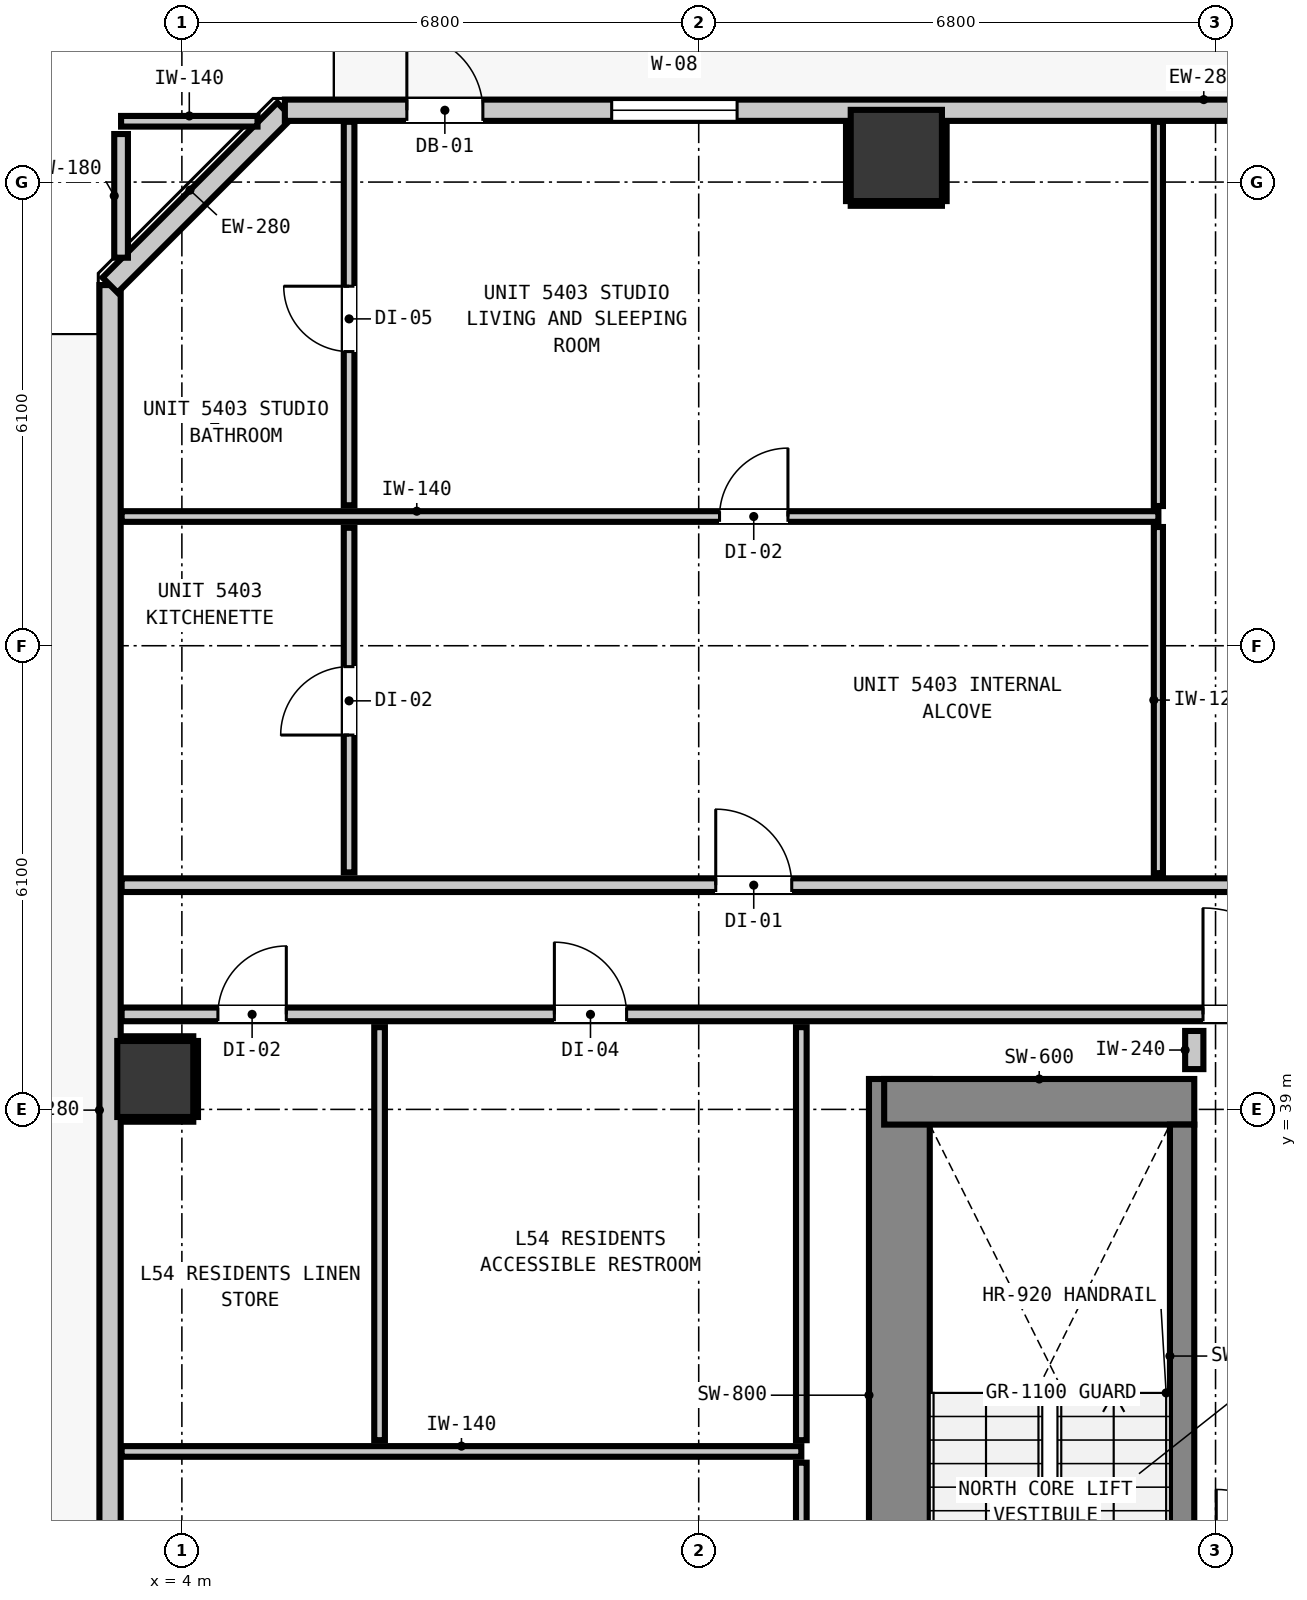
"""IFC4 building model, lengths in metres.
Left out: names, types, materials, properties, quantities, classifications, styles, units other than length and angle.
Written with IfcOpenShell. Run it as: python <this file> out.ifc"""

import sys

from ifc_helpers import new_model, si_unit, direction, frame, frame_2d, origin, origin_2d, place, context, subcontext, project, spatial, rectangle, extrude, element, fill, save


model = new_model("IFC4")
c1 = context("Model", 3, precision=1e-05, world=origin(), true_north=direction((0.0, 1.0)))
c2 = subcontext(c1, "Body", "Model", "MODEL_VIEW")
j1 = project(units=[si_unit("LENGTHUNIT", "METRE"), si_unit("PLANEANGLEUNIT", "RADIAN")], contexts=[c1])
p1 = place(None, origin())
s1 = spatial("IfcSite", under=j1, at=p1, CompositionType="ELEMENT")
p2 = place(p1, origin())
s2 = spatial("IfcBuilding", under=s1, at=p2, CompositionType="ELEMENT")
p3 = place(p2, frame((0.0, 0.0, 186.84)))
s3 = spatial("IfcBuildingStorey", under=s2, at=p3, CompositionType="ELEMENT", Elevation=186.84)
p4 = place(p3, frame((13.44, 31.08, 0.0), z_axis=(0.0, 0.0, 1.0), x_axis=(0.0, 1.0, 0.0)))
e1 = element("IfcWall", 1, at=p4, inside=s3, PredefinedType="SHEAR", context=c2, shape_type="SweptSolid", body=[
    extrude(rectangle(XDim=8.32, YDim=0.8, at=frame_2d((4.16, 0.0))), origin(), (0.0, 0.0, 1.0), 3.32),
])
p5 = place(p3, frame((13.24, 39.1, 0.0), z_axis=(0.0, 0.0, 1.0), x_axis=(1.0, 0.0, 0.0)))
e2 = element("IfcWall", 2, at=p5, inside=s3, PredefinedType="SHEAR", context=c2, shape_type="SweptSolid", body=[
    extrude(rectangle(XDim=4.08, YDim=0.6, at=frame_2d((2.04, 0.0))), origin(), (0.0, 0.0, 1.0), 3.32),
])
p6 = place(p3, frame((17.16, 31.0, 0.0), z_axis=(0.0, 0.0, 1.0), x_axis=(0.0, 1.0, 0.0)))
e3 = element("IfcWall", 3, at=p6, inside=s3, PredefinedType="SHEAR", context=c2, shape_type="SweptSolid", body=[
    extrude(rectangle(XDim=7.8, YDim=0.32, at=frame_2d((3.9, 0.0))), origin(), (0.0, 0.0, 1.0), 3.32),
])
p7 = place(p6, frame((0.51, 0.0, 0.0)))
e4 = element("IfcOpeningElement", 4, at=p7, cuts=e3, PredefinedType="OPENING", context=c2, shape_type="SweptSolid", body=[
    extrude(rectangle(XDim=1.1, YDim=2.15, at=frame_2d((0.55, 1.075))), frame((0.0, 0.17, 0.0), z_axis=(0.0, -1.0, 0.0), x_axis=(1.0, 0.0, 0.0)), (0.0, 0.0, 1.0), 0.34),
])
p8 = place(p3, frame((13.4, 51.55, 0.0), z_axis=(0.0, 0.0, 1.0), x_axis=(1.0, 0.0, 0.0)))
e5 = element("IfcColumn", 5, at=p8, inside=s3, PredefinedType="COLUMN", context=c2, shape_type="SweptSolid", body=[
    extrude(rectangle(XDim=1.2, YDim=1.2, at=origin_2d()), origin(), (0.0, 0.0, 1.0), 2.9),
])
p9 = place(p3, frame((3.65, 39.4, 0.0), z_axis=(0.0, 0.0, 1.0), x_axis=(1.0, 0.0, 0.0)))
e6 = element("IfcColumn", 6, at=p9, inside=s3, PredefinedType="COLUMN", context=c2, shape_type="SweptSolid", body=[
    extrude(rectangle(XDim=1.0, YDim=1.0, at=origin_2d()), origin(), (0.0, 0.0, 1.0), 2.9),
])
p10 = place(p3, frame((3.055, 17.555, 0.0), z_axis=(0.0, 0.0, 1.0), x_axis=(0.0, 1.0, 0.0)))
e7 = element("IfcWall", 7, at=p10, inside=s3, PredefinedType="STANDARD", context=c2, shape_type="SweptSolid", body=[
    extrude(rectangle(XDim=32.29, YDim=0.28, at=frame_2d((16.145, 0.0))), origin(), (0.0, 0.0, 1.0), 2.9),
])
p11 = place(p10, frame((5.467, 0.0, 0.0)))
e8 = element("IfcOpeningElement", 8, at=p11, cuts=e7, PredefinedType="OPENING", context=c2, shape_type="SweptSolid", body=[
    extrude(rectangle(XDim=1.0, YDim=2.15, at=frame_2d((0.5, 1.075))), frame((0.0, 0.15, 0.0), z_axis=(0.0, -1.0, 0.0), x_axis=(1.0, 0.0, 0.0)), (0.0, 0.0, 1.0), 0.3),
])
p12 = place(p10, frame((8.831, 0.0, 0.85)))
e9 = element("IfcOpeningElement", 9, at=p12, cuts=e7, PredefinedType="OPENING", context=c2, shape_type="SweptSolid", body=[
    extrude(rectangle(XDim=1.65, YDim=1.75, at=frame_2d((0.825, 0.875))), frame((0.0, 0.15, 0.0), z_axis=(0.0, -1.0, 0.0), x_axis=(1.0, 0.0, 0.0)), (0.0, 0.0, 1.0), 0.3),
])
p13 = place(p3, frame((3.055, 49.845, 0.0), z_axis=(0.0, 0.0, 1.0), x_axis=(0.707106781187, 0.707106781187, 0.0)))
e10 = element("IfcWall", 10, at=p13, inside=s3, PredefinedType="STANDARD", context=c2, shape_type="SweptSolid", body=[
    extrude(rectangle(XDim=3.253, YDim=0.28, at=frame_2d((1.626, 0.0))), origin(), (0.0, 0.0, 1.0), 2.9),
])
p14 = place(p3, frame((5.355, 52.145, 0.0), z_axis=(0.0, 0.0, 1.0), x_axis=(1.0, 0.0, 0.0)))
e11 = element("IfcWall", 11, at=p14, inside=s3, PredefinedType="STANDARD", context=c2, shape_type="SweptSolid", body=[
    extrude(rectangle(XDim=35.09, YDim=0.28, at=frame_2d((17.545, 0.0))), origin(), (0.0, 0.0, 1.0), 2.9),
])
p15 = place(p14, frame((1.605, 0.0, 0.0)))
e12 = element("IfcOpeningElement", 12, at=p15, cuts=e11, PredefinedType="OPENING", context=c2, shape_type="SweptSolid", body=[
    extrude(rectangle(XDim=1.0, YDim=2.15, at=frame_2d((0.5, 1.075))), frame((0.0, 0.15, 0.0), z_axis=(0.0, -1.0, 0.0), x_axis=(1.0, 0.0, 0.0)), (0.0, 0.0, 1.0), 0.3),
])
p16 = place(p14, frame((4.3, 0.0, 0.85)))
e13 = element("IfcOpeningElement", 13, at=p16, cuts=e11, PredefinedType="OPENING", context=c2, shape_type="SweptSolid", body=[
    extrude(rectangle(XDim=1.65, YDim=1.75, at=frame_2d((0.825, 0.875))), frame((0.0, 0.15, 0.0), z_axis=(0.0, -1.0, 0.0), x_axis=(1.0, 0.0, 0.0)), (0.0, 0.0, 1.0), 0.3),
])
p17 = place(p14, frame((18.23, 0.0, 0.85)))
e14 = element("IfcOpeningElement", 14, at=p17, cuts=e11, PredefinedType="OPENING", context=c2, shape_type="SweptSolid", body=[
    extrude(rectangle(XDim=1.65, YDim=1.75, at=frame_2d((0.825, 0.875))), frame((0.0, 0.15, 0.0), z_axis=(0.0, -1.0, 0.0), x_axis=(1.0, 0.0, 0.0)), (0.0, 0.0, 1.0), 0.3),
])
p18 = place(p14, frame((26.67, 0.0, 0.85)))
e15 = element("IfcOpeningElement", 15, at=p18, cuts=e11, PredefinedType="OPENING", context=c2, shape_type="SweptSolid", body=[
    extrude(rectangle(XDim=1.65, YDim=1.75, at=frame_2d((0.825, 0.875))), frame((0.0, 0.15, 0.0), z_axis=(0.0, -1.0, 0.0), x_axis=(1.0, 0.0, 0.0)), (0.0, 0.0, 1.0), 0.3),
])
p19 = place(p3, frame((3.207, 40.25, 0.0), z_axis=(0.0, 0.0, 1.0), x_axis=(1.0, 0.0, 0.0)))
e16 = element("IfcWall", 16, at=p19, inside=s3, PredefinedType="PARTITIONING", context=c2, shape_type="SweptSolid", body=[
    extrude(rectangle(XDim=39.386, YDim=0.18, at=frame_2d((19.693, 0.0))), origin(), (0.0, 0.0, 1.0), 2.9),
])
p20 = place(p19, frame((14.228, 0.0, 0.0)))
e17 = element("IfcOpeningElement", 17, at=p20, cuts=e16, PredefinedType="OPENING", context=c2, shape_type="SweptSolid", body=[
    extrude(rectangle(XDim=1.4, YDim=2.15, at=frame_2d((0.7, 1.075))), frame((0.0, 0.1, 0.0), z_axis=(0.0, -1.0, 0.0), x_axis=(1.0, 0.0, 0.0)), (0.0, 0.0, 1.0), 0.2),
])
p21 = place(p19, frame((1.267, 0.0, 0.0)))
e18 = element("IfcOpeningElement", 18, at=p21, cuts=e16, PredefinedType="OPENING", context=c2, shape_type="SweptSolid", body=[
    extrude(rectangle(XDim=0.9, YDim=2.1, at=frame_2d((0.45, 1.05))), frame((0.0, 0.1, 0.0), z_axis=(0.0, -1.0, 0.0), x_axis=(1.0, 0.0, 0.0)), (0.0, 0.0, 1.0), 0.2),
])
p22 = place(p19, frame((5.694, 0.0, 0.0)))
e19 = element("IfcOpeningElement", 19, at=p22, cuts=e16, PredefinedType="OPENING", context=c2, shape_type="SweptSolid", body=[
    extrude(rectangle(XDim=0.95, YDim=2.1, at=frame_2d((0.475, 1.05))), frame((0.0, 0.1, 0.0), z_axis=(0.0, -1.0, 0.0), x_axis=(1.0, 0.0, 0.0)), (0.0, 0.0, 1.0), 0.2),
])
p23 = place(p19, frame((36.494, 0.0, 0.0)))
e20 = element("IfcOpeningElement", 20, at=p23, cuts=e16, PredefinedType="OPENING", context=c2, shape_type="SweptSolid", body=[
    extrude(rectangle(XDim=0.9, YDim=2.1, at=frame_2d((0.45, 1.05))), frame((0.0, 0.1, 0.0), z_axis=(0.0, -1.0, 0.0), x_axis=(1.0, 0.0, 0.0)), (0.0, 0.0, 1.0), 0.2),
])
p24 = place(p3, frame((3.207, 41.95, 0.0), z_axis=(0.0, 0.0, 1.0), x_axis=(1.0, 0.0, 0.0)))
e21 = element("IfcWall", 21, at=p24, inside=s3, PredefinedType="PARTITIONING", context=c2, shape_type="SweptSolid", body=[
    extrude(rectangle(XDim=39.386, YDim=0.18, at=frame_2d((19.693, 0.0))), origin(), (0.0, 0.0, 1.0), 2.9),
])
p25 = place(p24, frame((7.817, 0.0, 0.0)))
e22 = element("IfcOpeningElement", 22, at=p25, cuts=e21, PredefinedType="OPENING", context=c2, shape_type="SweptSolid", body=[
    extrude(rectangle(XDim=1.0, YDim=2.15, at=frame_2d((0.5, 1.075))), frame((0.0, 0.1, 0.0), z_axis=(0.0, -1.0, 0.0), x_axis=(1.0, 0.0, 0.0)), (0.0, 0.0, 1.0), 0.2),
])
p26 = place(p24, frame((18.527, 0.0, 0.0)))
e23 = element("IfcOpeningElement", 23, at=p26, cuts=e21, PredefinedType="OPENING", context=c2, shape_type="SweptSolid", body=[
    extrude(rectangle(XDim=0.9, YDim=2.1, at=frame_2d((0.45, 1.05))), frame((0.0, 0.1, 0.0), z_axis=(0.0, -1.0, 0.0), x_axis=(1.0, 0.0, 0.0)), (0.0, 0.0, 1.0), 0.2),
])
p27 = place(p24, frame((31.379, 0.0, 0.0)))
e24 = element("IfcOpeningElement", 24, at=p27, cuts=e21, PredefinedType="OPENING", context=c2, shape_type="SweptSolid", body=[
    extrude(rectangle(XDim=0.9, YDim=2.1, at=frame_2d((0.45, 1.05))), frame((0.0, 0.1, 0.0), z_axis=(0.0, -1.0, 0.0), x_axis=(1.0, 0.0, 0.0)), (0.0, 0.0, 1.0), 0.2),
])
p28 = place(p3, frame((3.207, 34.5, 0.0), z_axis=(0.0, 0.0, 1.0), x_axis=(1.0, 0.0, 0.0)))
e25 = element("IfcWall", 25, at=p28, inside=s3, PredefinedType="PARTITIONING", context=c2, shape_type="SweptSolid", body=[
    extrude(rectangle(XDim=8.943, YDim=0.14, at=frame_2d((4.471, 0.0))), origin(), (0.0, 0.0, 1.0), 2.9),
])
p29 = place(p3, frame((3.207, 46.8, 0.0), z_axis=(0.0, 0.0, 1.0), x_axis=(1.0, 0.0, 0.0)))
e26 = element("IfcWall", 26, at=p29, inside=s3, PredefinedType="PARTITIONING", context=c2, shape_type="SweptSolid", body=[
    extrude(rectangle(XDim=13.641, YDim=0.14, at=frame_2d((6.82, 0.0))), origin(), (0.0, 0.0, 1.0), 2.9),
])
p30 = place(p29, frame((7.867, 0.0, 0.0)))
e27 = element("IfcOpeningElement", 27, at=p30, cuts=e26, PredefinedType="OPENING", context=c2, shape_type="SweptSolid", body=[
    extrude(rectangle(XDim=0.9, YDim=2.1, at=frame_2d((0.45, 1.05))), frame((0.0, 0.08, 0.0), z_axis=(0.0, -1.0, 0.0), x_axis=(1.0, 0.0, 0.0)), (0.0, 0.0, 1.0), 0.16),
])
p31 = place(p3, frame((3.2, 52.0, 0.0), z_axis=(0.0, 0.0, 1.0), x_axis=(1.0, 0.0, 0.0)))
e28 = element("IfcWall", 28, at=p31, inside=s3, PredefinedType="PARTITIONING", context=c2, shape_type="SweptSolid", body=[
    extrude(rectangle(XDim=1.795, YDim=0.14, at=frame_2d((0.897, 0.0))), origin(), (0.0, 0.0, 1.0), 2.9),
])
p32 = place(p3, frame((17.32, 39.53, 0.0), z_axis=(0.0, 0.0, 1.0), x_axis=(0.0, 1.0, 0.0)))
e29 = element("IfcWall", 29, at=p32, inside=s3, PredefinedType="PARTITIONING", context=c2, shape_type="SweptSolid", body=[
    extrude(rectangle(XDim=0.502, YDim=0.24, at=frame_2d((0.251, 0.0))), origin(), (0.0, 0.0, 1.0), 2.9),
])
p33 = place(p3, frame((3.2, 50.205, 0.0), z_axis=(0.0, 0.0, 1.0), x_axis=(0.0, 1.0, 0.0)))
e30 = element("IfcWall", 30, at=p33, inside=s3, PredefinedType="PARTITIONING", context=c2, shape_type="SweptSolid", body=[
    extrude(rectangle(XDim=1.627, YDim=0.18, at=frame_2d((0.813, 0.0))), origin(), (0.0, 0.0, 1.0), 2.9),
])
p34 = place(p3, frame((6.2, 42.118, 0.0), z_axis=(0.0, 0.0, 1.0), x_axis=(0.0, 1.0, 0.0)))
e31 = element("IfcWall", 31, at=p34, inside=s3, PredefinedType="PARTITIONING", context=c2, shape_type="SweptSolid", body=[
    extrude(rectangle(XDim=4.534, YDim=0.14, at=frame_2d((2.267, 0.0))), origin(), (0.0, 0.0, 1.0), 2.9),
])
p35 = place(p34, frame((1.807, 0.0, 0.0)))
e32 = element("IfcOpeningElement", 32, at=p35, cuts=e31, PredefinedType="OPENING", context=c2, shape_type="SweptSolid", body=[
    extrude(rectangle(XDim=0.9, YDim=2.1, at=frame_2d((0.45, 1.05))), frame((0.0, 0.08, 0.0), z_axis=(0.0, -1.0, 0.0), x_axis=(1.0, 0.0, 0.0)), (0.0, 0.0, 1.0), 0.16),
])
p36 = place(p3, frame((6.2, 46.948, 0.0), z_axis=(0.0, 0.0, 1.0), x_axis=(0.0, 1.0, 0.0)))
e33 = element("IfcWall", 33, at=p36, inside=s3, PredefinedType="PARTITIONING", context=c2, shape_type="SweptSolid", body=[
    extrude(rectangle(XDim=5.045, YDim=0.14, at=frame_2d((2.522, 0.0))), origin(), (0.0, 0.0, 1.0), 2.9),
])
p37 = place(p36, frame((2.022, 0.0, 0.0)))
e34 = element("IfcOpeningElement", 34, at=p37, cuts=e33, PredefinedType="OPENING", context=c2, shape_type="SweptSolid", body=[
    extrude(rectangle(XDim=0.86, YDim=2.02, at=frame_2d((0.43, 1.01))), frame((0.0, 0.08, 0.0), z_axis=(0.0, -1.0, 0.0), x_axis=(1.0, 0.0, 0.0)), (0.0, 0.0, 1.0), 0.16),
])
p38 = place(p3, frame((6.601, 34.648, 0.0), z_axis=(0.0, 0.0, 1.0), x_axis=(0.0, 1.0, 0.0)))
e35 = element("IfcWall", 35, at=p38, inside=s3, PredefinedType="PARTITIONING", context=c2, shape_type="SweptSolid", body=[
    extrude(rectangle(XDim=5.434, YDim=0.14, at=frame_2d((2.717, 0.0))), origin(), (0.0, 0.0, 1.0), 2.9),
])
p39 = place(p3, frame((12.15, 21.348, 0.0), z_axis=(0.0, 0.0, 1.0), x_axis=(0.0, 1.0, 0.0)))
e36 = element("IfcWall", 36, at=p39, inside=s3, PredefinedType="PARTITIONING", context=c2, shape_type="SweptSolid", body=[
    extrude(rectangle(XDim=13.004, YDim=0.14, at=frame_2d((6.502, 0.0))), origin(), (0.0, 0.0, 1.0), 2.9),
])
p40 = place(p3, frame((12.15, 34.648, 0.0), z_axis=(0.0, 0.0, 1.0), x_axis=(0.0, 1.0, 0.0)))
e37 = element("IfcWall", 37, at=p40, inside=s3, PredefinedType="PARTITIONING", context=c2, shape_type="SweptSolid", body=[
    extrude(rectangle(XDim=5.434, YDim=0.14, at=frame_2d((2.717, 0.0))), origin(), (0.0, 0.0, 1.0), 2.9),
])
p41 = place(p3, frame((16.848, 42.108, 0.0), z_axis=(0.0, 0.0, 1.0), x_axis=(0.0, 1.0, 0.0)))
e38 = element("IfcWall", 38, at=p41, inside=s3, PredefinedType="PARTITIONING", context=c2, shape_type="SweptSolid", body=[
    extrude(rectangle(XDim=4.554, YDim=0.12, at=frame_2d((2.277, 0.0))), origin(), (0.0, 0.0, 1.0), 2.9),
])
p42 = place(p3, frame((16.848, 46.938, 0.0), z_axis=(0.0, 0.0, 1.0), x_axis=(0.0, 1.0, 0.0)))
e39 = element("IfcWall", 39, at=p42, inside=s3, PredefinedType="PARTITIONING", context=c2, shape_type="SweptSolid", body=[
    extrude(rectangle(XDim=5.055, YDim=0.12, at=frame_2d((2.527, 0.0))), origin(), (0.0, 0.0, 1.0), 2.9),
])
p43 = place(p3, frame((12.8, 50.918, 0.0), z_axis=(0.0, 0.0, 1.0), x_axis=(1.0, 0.0, 0.0)))
e40 = element("IfcWall", 40, at=p43, inside=s3, PredefinedType="PARTITIONING", context=c2, shape_type="SweptSolid", body=[
    extrude(rectangle(XDim=1.2, YDim=0.06, at=frame_2d((0.6, 0.0))), origin(), (0.0, 0.0, 1.0), 1.45),
])
for number, where, z_axis, x_axis in (
    (41, (12.768, 50.95, 0.0), (0.0, 0.0, 1.0), (0.0, 1.0, 0.0)),
    (42, (14.032, 50.95, 0.0), (0.0, 0.0, 1.0), (0.0, 1.0, 0.0)),
):
    element("IfcWall", number, at=place(p3, frame(where, z_axis=z_axis, x_axis=x_axis)), inside=s3, PredefinedType="PARTITIONING", context=c2, shape_type="SweptSolid", body=[
        extrude(rectangle(XDim=1.04, YDim=0.06, at=frame_2d((0.52, 0.0))), origin(), (0.0, 0.0, 1.0), 0.905),
    ])
for number, where, z_axis, x_axis in (
    (43, (3.21, 38.868, 0.0), (0.0, 0.0, 1.0), (1.0, 0.0, 0.0)),
    (44, (3.21, 39.932, 0.0), (0.0, 0.0, 1.0), (1.0, 0.0, 0.0)),
):
    element("IfcWall", number, at=place(p3, frame(where, z_axis=z_axis, x_axis=x_axis)), inside=s3, PredefinedType="PARTITIONING", context=c2, shape_type="SweptSolid", body=[
        extrude(rectangle(XDim=0.94, YDim=0.06, at=frame_2d((0.47, 0.0))), origin(), (0.0, 0.0, 1.0), 0.905),
    ])
p44 = place(p3, frame((4.182, 38.9, 0.0), z_axis=(0.0, 0.0, 1.0), x_axis=(0.0, 1.0, 0.0)))
e45 = element("IfcWall", 45, at=p44, inside=s3, PredefinedType="PARTITIONING", context=c2, shape_type="SweptSolid", body=[
    extrude(rectangle(XDim=1.0, YDim=0.06, at=frame_2d((0.5, 0.0))), origin(), (0.0, 0.0, 1.0), 1.45),
])
p45 = place(p15, origin())
e46 = element("IfcDoor", 46, at=p45, inside=s3, OperationType="SINGLE_SWING_LEFT", PredefinedType="DOOR", context=c2, shape_type="SweptSolid", body=[
    extrude(rectangle(XDim=1.0, YDim=2.15, at=frame_2d((0.5, 1.075))), frame((0.0, 0.025, 0.0), z_axis=(0.0, -1.0, 0.0), x_axis=(1.0, 0.0, 0.0)), (0.0, 0.0, 1.0), 0.05),
])
fill(e12, e46)
p46 = place(p16, origin())
e47 = element("IfcWindow", 47, at=p46, inside=s3, PartitioningType="SINGLE_PANEL", PredefinedType="WINDOW", context=c2, shape_type="SweptSolid", body=[
    extrude(rectangle(XDim=1.65, YDim=1.75, at=frame_2d((0.825, 0.875))), frame((0.0, 0.03, 0.0), z_axis=(0.0, -1.0, 0.0), x_axis=(1.0, 0.0, 0.0)), (0.0, 0.0, 1.0), 0.06),
])
fill(e13, e47)
p47 = place(p20, origin())
e48 = element("IfcDoor", 48, at=p47, inside=s3, OperationType="SINGLE_SWING_LEFT", PredefinedType="DOOR", context=c2, shape_type="SweptSolid", body=[
    extrude(rectangle(XDim=1.4, YDim=2.15, at=frame_2d((0.7, 1.075))), frame((0.0, 0.025, 0.0), z_axis=(0.0, -1.0, 0.0), x_axis=(1.0, 0.0, 0.0)), (0.0, 0.0, 1.0), 0.05),
])
fill(e17, e48)
p48 = place(p25, origin())
e49 = element("IfcDoor", 49, at=p48, inside=s3, OperationType="SINGLE_SWING_LEFT", PredefinedType="DOOR", context=c2, shape_type="SweptSolid", body=[
    extrude(rectangle(XDim=1.0, YDim=2.15, at=frame_2d((0.5, 1.075))), frame((0.0, 0.025, 0.0), z_axis=(0.0, -1.0, 0.0), x_axis=(1.0, 0.0, 0.0)), (0.0, 0.0, 1.0), 0.05),
])
fill(e22, e49)
p49 = place(p30, origin())
e50 = element("IfcDoor", 50, at=p49, inside=s3, OperationType="SINGLE_SWING_RIGHT", PredefinedType="DOOR", context=c2, shape_type="SweptSolid", body=[
    extrude(rectangle(XDim=0.9, YDim=2.1, at=frame_2d((0.45, 1.05))), frame((0.0, 0.025, 0.0), z_axis=(0.0, -1.0, 0.0), x_axis=(1.0, 0.0, 0.0)), (0.0, 0.0, 1.0), 0.05),
])
fill(e27, e50)
p50 = place(p35, origin())
e51 = element("IfcDoor", 51, at=p50, inside=s3, OperationType="SINGLE_SWING_LEFT", PredefinedType="DOOR", context=c2, shape_type="SweptSolid", body=[
    extrude(rectangle(XDim=0.9, YDim=2.1, at=frame_2d((0.45, 1.05))), frame((0.0, 0.025, 0.0), z_axis=(0.0, -1.0, 0.0), x_axis=(1.0, 0.0, 0.0)), (0.0, 0.0, 1.0), 0.05),
])
fill(e32, e51)
p51 = place(p37, origin())
e52 = element("IfcDoor", 52, at=p51, inside=s3, OperationType="SINGLE_SWING_RIGHT", PredefinedType="DOOR", context=c2, shape_type="SweptSolid", body=[
    extrude(rectangle(XDim=0.86, YDim=2.02, at=frame_2d((0.43, 1.01))), frame((0.0, 0.025, 0.0), z_axis=(0.0, -1.0, 0.0), x_axis=(1.0, 0.0, 0.0)), (0.0, 0.0, 1.0), 0.05),
])
fill(e34, e52)
p52 = place(p21, origin())
e53 = element("IfcDoor", 53, at=p52, inside=s3, OperationType="SINGLE_SWING_RIGHT", PredefinedType="DOOR", context=c2, shape_type="SweptSolid", body=[
    extrude(rectangle(XDim=0.9, YDim=2.1, at=frame_2d((0.45, 1.05))), frame((0.0, 0.025, 0.0), z_axis=(0.0, -1.0, 0.0), x_axis=(1.0, 0.0, 0.0)), (0.0, 0.0, 1.0), 0.05),
])
fill(e18, e53)
p53 = place(p22, origin())
e54 = element("IfcDoor", 54, at=p53, inside=s3, OperationType="SINGLE_SWING_LEFT", PredefinedType="DOOR", context=c2, shape_type="SweptSolid", body=[
    extrude(rectangle(XDim=0.95, YDim=2.1, at=frame_2d((0.475, 1.05))), frame((0.0, 0.025, 0.0), z_axis=(0.0, -1.0, 0.0), x_axis=(1.0, 0.0, 0.0)), (0.0, 0.0, 1.0), 0.05),
])
fill(e19, e54)
save(model, sys.argv[1])
